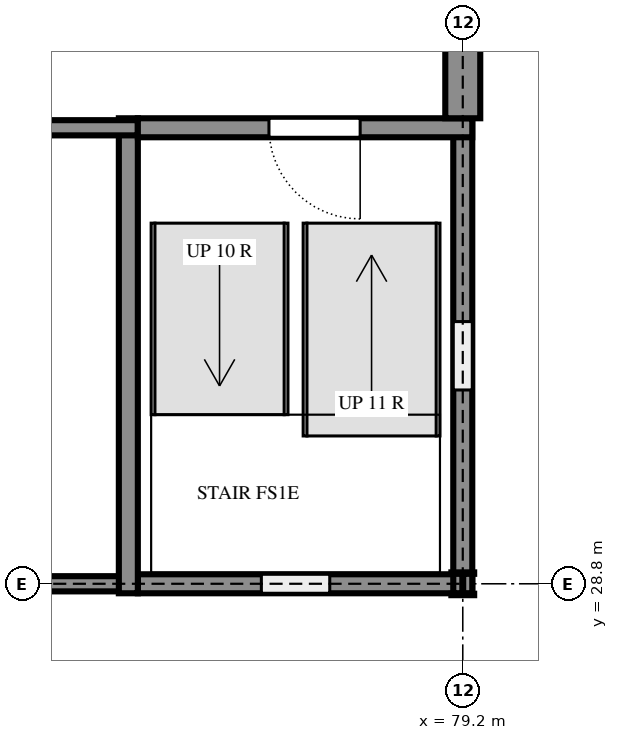
"""IFC4 building model, lengths in metres.
Left out: names, types, materials, properties, quantities, classifications, styles, units other than length and angle.
Written with IfcOpenShell. Run it as: python <this file> out.ifc"""

import sys

from ifc_helpers import new_model, si_unit, direction, frame, frame_2d, origin, origin_2d, place, context, subcontext, project, spatial, rectangle, i_section, extrude, element, fill, save


model = new_model("IFC4")
c1 = context("Model", 3, precision=1e-05, world=origin(), true_north=direction((0.0, 1.0)))
c2 = subcontext(c1, "Body", "Model", "MODEL_VIEW")
j1 = project(units=[si_unit("LENGTHUNIT", "METRE"), si_unit("PLANEANGLEUNIT", "RADIAN")], contexts=[c1])
p1 = place(None, origin())
s1 = spatial("IfcSite", under=j1, at=p1, CompositionType="ELEMENT")
p2 = place(p1, origin())
s2 = spatial("IfcBuilding", under=s1, at=p2, CompositionType="ELEMENT")
p3 = place(p2, frame((0.0, 0.0, 10.8)))
s3 = spatial("IfcBuildingStorey", under=s2, at=p3, CompositionType="ELEMENT", Elevation=10.8)
p4 = place(p3, frame((79.2, 28.8, 0.0), z_axis=(0.0, 0.0, 1.0), x_axis=(1.0, 0.0, 0.0)))
e1 = element("IfcColumn", 1, at=p4, inside=s3, PredefinedType="COLUMN", context=c2, shape_type="SweptSolid", body=[
    extrude(i_section(OverallWidth=0.3, OverallDepth=0.3, WebThickness=0.011, FlangeThickness=0.019, FilletRadius=0.027, at=origin_2d()), origin(), (0.0, 0.0, 1.0), 3.6),
])
p5 = place(p3, frame((71.9, 28.8, 0.0), z_axis=(0.0, 0.0, 1.0), x_axis=(1.0, 0.0, 0.0)))
e2 = element("IfcWall", 2, at=p5, inside=s3, PredefinedType="SHEAR", context=c2, shape_type="SweptSolid", body=[
    extrude(rectangle(XDim=3.025, YDim=0.2, at=frame_2d((1.513, 0.0))), origin(), (0.0, 0.0, 1.0), 3.6),
])
p6 = place(p3, frame((74.925, 28.8, 0.0), z_axis=(0.0, 0.0, 1.0), x_axis=(1.0, 0.0, 0.0)))
e3 = element("IfcWall", 3, at=p6, inside=s3, PredefinedType="SHEAR", context=c2, shape_type="SweptSolid", body=[
    extrude(rectangle(XDim=4.4, YDim=0.25, at=frame_2d((2.2, 0.0))), origin(), (0.0, 0.0, 1.0), 3.6),
])
p7 = place(p6, frame((1.625, 0.0, 0.6)))
e4 = element("IfcOpeningElement", 4, at=p7, cuts=e3, PredefinedType="OPENING", context=c2, shape_type="SweptSolid", body=[
    extrude(rectangle(XDim=0.9, YDim=2.1, at=frame_2d((0.45, 1.05))), frame((0.0, 0.135, 0.0), z_axis=(0.0, -1.0, 0.0), x_axis=(1.0, 0.0, 0.0)), (0.0, 0.0, 1.0), 0.27),
])
p8 = place(p3, frame((79.2, 28.675, 0.0), z_axis=(0.0, 0.0, 1.0), x_axis=(0.0, 1.0, 0.0)))
e5 = element("IfcWall", 5, at=p8, inside=s3, PredefinedType="SHEAR", context=c2, shape_type="SweptSolid", body=[
    extrude(rectangle(XDim=6.25, YDim=0.25, at=frame_2d((3.125, 0.0))), origin(), (0.0, 0.0, 1.0), 3.6),
])
p9 = place(p8, frame((2.675, 0.0, 0.6)))
e6 = element("IfcOpeningElement", 6, at=p9, cuts=e5, PredefinedType="OPENING", context=c2, shape_type="SweptSolid", body=[
    extrude(rectangle(XDim=0.9, YDim=2.1, at=frame_2d((0.45, 1.05))), frame((0.0, 0.135, 0.0), z_axis=(0.0, -1.0, 0.0), x_axis=(1.0, 0.0, 0.0)), (0.0, 0.0, 1.0), 0.27),
])
p10 = place(p3, frame((74.8, 34.925, 0.0), z_axis=(0.0, 0.0, 1.0), x_axis=(0.0, -1.0, 0.0)))
e7 = element("IfcWall", 7, at=p10, inside=s3, PredefinedType="SHEAR", context=c2, shape_type="SweptSolid", body=[
    extrude(rectangle(XDim=6.25, YDim=0.25, at=frame_2d((3.125, 0.0))), origin(), (0.0, 0.0, 1.0), 3.6),
])
p11 = place(p3, frame((74.925, 34.8, 0.0), z_axis=(0.0, 0.0, 1.0), x_axis=(-1.0, 0.0, 0.0)))
e8 = element("IfcWall", 8, at=p11, inside=s3, PredefinedType="SHEAR", context=c2, shape_type="SweptSolid", body=[
    extrude(rectangle(XDim=3.025, YDim=0.2, at=frame_2d((1.513, 0.0))), origin(), (0.0, 0.0, 1.0), 3.6),
])
p12 = place(p3, frame((79.325, 34.8, 0.0), z_axis=(0.0, 0.0, 1.0), x_axis=(-1.0, 0.0, 0.0)))
e9 = element("IfcWall", 9, at=p12, inside=s3, PredefinedType="SHEAR", context=c2, shape_type="SweptSolid", body=[
    extrude(rectangle(XDim=4.4, YDim=0.25, at=frame_2d((2.2, 0.0))), origin(), (0.0, 0.0, 1.0), 3.6),
])
p13 = place(p12, frame((1.475, 0.0, 0.0)))
e10 = element("IfcOpeningElement", 10, at=p13, cuts=e9, PredefinedType="OPENING", context=c2, shape_type="SweptSolid", body=[
    extrude(rectangle(XDim=1.2, YDim=2.4, at=frame_2d((0.6, 1.2))), frame((0.0, 0.135, 0.0), z_axis=(0.0, -1.0, 0.0), x_axis=(1.0, 0.0, 0.0)), (0.0, 0.0, 1.0), 0.27),
])
p14 = place(p3, frame((79.2, 34.925, 0.0), z_axis=(0.0, 0.0, 1.0), x_axis=(0.0, 1.0, 0.0)))
e11 = element("IfcWall", 11, at=p14, inside=s3, PredefinedType="SOLIDWALL", context=c2, shape_type="SweptSolid", body=[
    extrude(rectangle(XDim=1.225, YDim=0.46, at=frame_2d((0.612, 0.0))), origin(), (0.0, 0.0, 1.0), 3.22),
])
p15 = place(p9, origin())
e12 = element("IfcWindow", 12, at=p15, inside=s3, PartitioningType="SINGLE_PANEL", PredefinedType="WINDOW", context=c2, shape_type="SweptSolid", body=[
    extrude(rectangle(XDim=0.9, YDim=2.1, at=frame_2d((0.45, 1.05))), frame((0.0, 0.03, 0.0), z_axis=(0.0, -1.0, 0.0), x_axis=(1.0, 0.0, 0.0)), (0.0, 0.0, 1.0), 0.06),
])
fill(e6, e12)
p16 = place(p7, origin())
e13 = element("IfcWindow", 13, at=p16, inside=s3, PartitioningType="SINGLE_PANEL", PredefinedType="WINDOW", context=c2, shape_type="SweptSolid", body=[
    extrude(rectangle(XDim=0.9, YDim=2.1, at=frame_2d((0.45, 1.05))), frame((0.0, 0.03, 0.0), z_axis=(0.0, -1.0, 0.0), x_axis=(1.0, 0.0, 0.0)), (0.0, 0.0, 1.0), 0.06),
])
fill(e4, e13)
p17 = place(p13, origin())
e14 = element("IfcDoor", 14, at=p17, inside=s3, OperationType="SINGLE_SWING_RIGHT", PredefinedType="DOOR", context=c2, shape_type="SweptSolid", body=[
    extrude(rectangle(XDim=1.2, YDim=2.4, at=frame_2d((0.6, 1.2))), frame((0.0, 0.025, 0.0), z_axis=(0.0, -1.0, 0.0), x_axis=(1.0, 0.0, 0.0)), (0.0, 0.0, 1.0), 0.05),
])
fill(e10, e14)
save(model, sys.argv[1])
